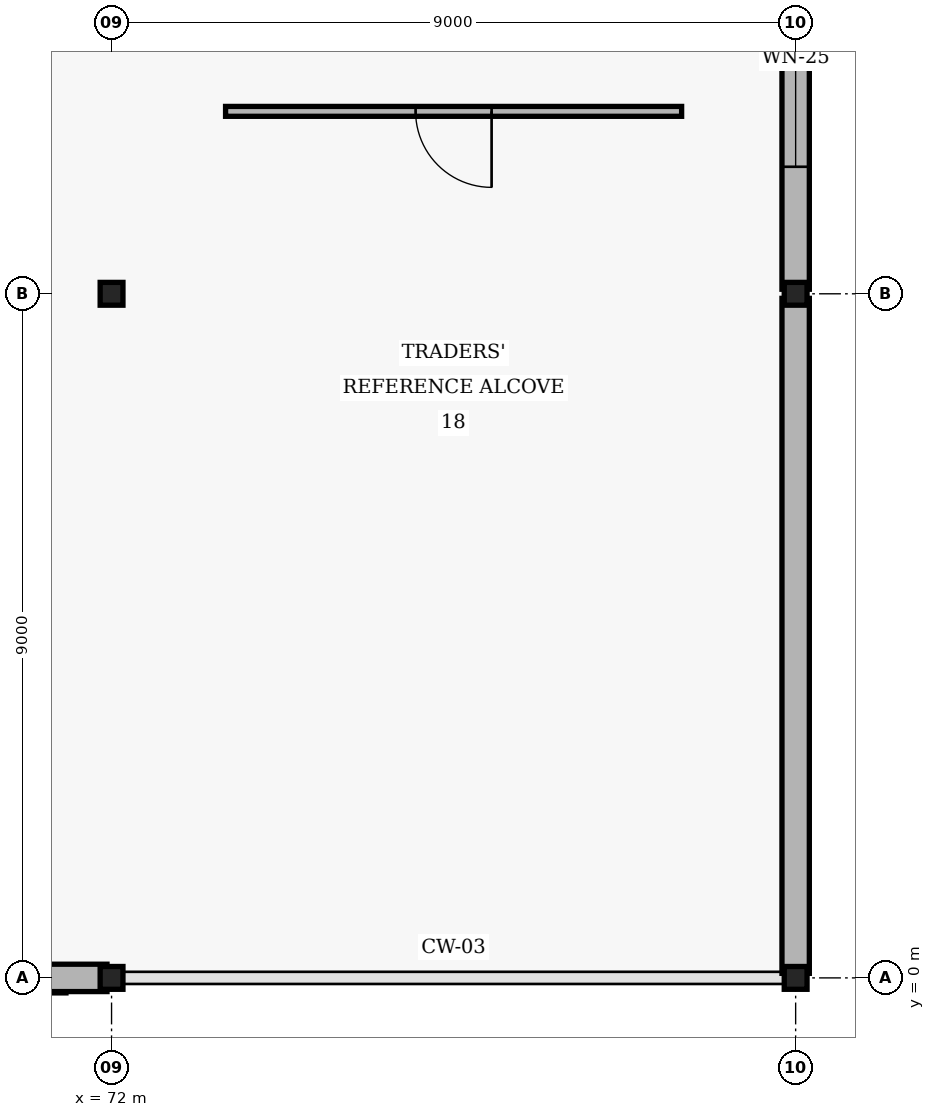
"""IFC4 building model, lengths in metres.
Left out: names, types, materials, properties, quantities, classifications, styles, units other than length and angle.
Written with IfcOpenShell. Run it as: python <this file> out.ifc"""

import sys

from ifc_helpers import new_model, si_unit, direction, frame, frame_2d, origin, origin_2d, place, context, subcontext, project, spatial, rectangle, i_section, extrude, element, fill, save


model = new_model("IFC4")
c1 = context("Model", 3, precision=1e-05, world=origin(), true_north=direction((0.0, 1.0)))
c2 = subcontext(c1, "Body", "Model", "MODEL_VIEW")
j1 = project(units=[si_unit("LENGTHUNIT", "METRE"), si_unit("PLANEANGLEUNIT", "RADIAN")], contexts=[c1])
p1 = place(None, origin())
s1 = spatial("IfcSite", under=j1, at=p1, CompositionType="ELEMENT")
p2 = place(p1, origin())
s2 = spatial("IfcBuilding", under=s1, at=p2, CompositionType="ELEMENT")
p3 = place(p2, frame((0.0, 0.0, 9.6)))
s3 = spatial("IfcBuildingStorey", under=s2, at=p3, CompositionType="ELEMENT", Elevation=9.6)
for number, where, z_axis, x_axis in (
    (1, (72.0, 0.0, 0.0), (0.0, 0.0, 1.0), (1.0, 0.0, 0.0)),
    (2, (72.0, 9.0, 0.0), (0.0, 0.0, 1.0), (1.0, 0.0, 0.0)),
    (3, (81.0, 0.0, 0.0), (0.0, 0.0, 1.0), (1.0, 0.0, 0.0)),
    (4, (81.0, 9.0, 0.0), (0.0, 0.0, 1.0), (1.0, 0.0, 0.0)),
):
    element("IfcColumn", number, at=place(p3, frame(where, z_axis=z_axis, x_axis=x_axis)), inside=s3, PredefinedType="COLUMN", context=c2, shape_type="SweptSolid", body=[
        extrude(i_section(OverallWidth=0.3, OverallDepth=0.3, WebThickness=0.011, FlangeThickness=0.019, FilletRadius=0.027, at=origin_2d()), origin(), (0.0, 0.0, 1.0), 3.9),
    ])
for number, where, z_axis, x_axis in (
    (5, (63.06, 0.0, 0.0), (0.0, 0.0, 1.0), (1.0, 0.0, 0.0)),
    (6, (81.0, 0.06, 0.0), (0.0, 0.0, 1.0), (0.0, 1.0, 0.0)),
):
    element("IfcWall", number, at=place(p3, frame(where, z_axis=z_axis, x_axis=x_axis)), inside=s3, PredefinedType="SOLIDWALL", context=c2, shape_type="SweptSolid", body=[
        extrude(rectangle(XDim=8.88, YDim=0.36, at=frame_2d((4.44, 0.0))), origin(), (0.0, 0.0, 1.0), 3.25),
    ])
p4 = place(p3, frame((81.0, 9.06, 0.0), z_axis=(0.0, 0.0, 1.0), x_axis=(0.0, 1.0, 0.0)))
e7 = element("IfcWall", 7, at=p4, inside=s3, PredefinedType="SOLIDWALL", context=c2, shape_type="SweptSolid", body=[
    extrude(rectangle(XDim=8.88, YDim=0.36, at=frame_2d((4.44, 0.0))), origin(), (0.0, 0.0, 1.0), 3.25),
])
p5 = place(p4, frame((1.611, 0.0, 0.9)))
e8 = element("IfcOpeningElement", 8, at=p5, cuts=e7, PredefinedType="OPENING", context=c2, shape_type="SweptSolid", body=[
    extrude(rectangle(XDim=1.75, YDim=2.25, at=frame_2d((0.875, 1.125))), frame((0.0, 0.19, 0.0), z_axis=(0.0, -1.0, 0.0), x_axis=(1.0, 0.0, 0.0)), (0.0, 0.0, 1.0), 0.38),
])
p6 = place(p4, frame((5.519, 0.0, 0.9)))
e9 = element("IfcOpeningElement", 9, at=p6, cuts=e7, PredefinedType="OPENING", context=c2, shape_type="SweptSolid", body=[
    extrude(rectangle(XDim=1.75, YDim=2.25, at=frame_2d((0.875, 1.125))), frame((0.0, 0.19, 0.0), z_axis=(0.0, -1.0, 0.0), x_axis=(1.0, 0.0, 0.0)), (0.0, 0.0, 1.0), 0.38),
])
p7 = place(p3, frame((73.5, 11.4, 0.0), z_axis=(0.0, 0.0, 1.0), x_axis=(1.0, 0.0, 0.0)))
e10 = element("IfcWall", 10, at=p7, inside=s3, PredefinedType="PARTITIONING", context=c2, shape_type="SweptSolid", body=[
    extrude(rectangle(XDim=6.0, YDim=0.13, at=frame_2d((3.0, 0.0))), origin(), (0.0, 0.0, 1.0), 2.9),
])
p8 = place(p7, frame((2.5, 0.0, 0.0)))
e11 = element("IfcOpeningElement", 11, at=p8, cuts=e10, PredefinedType="OPENING", context=c2, shape_type="SweptSolid", body=[
    extrude(rectangle(XDim=1.0, YDim=2.1, at=frame_2d((0.5, 1.05))), frame((0.0, 0.075, 0.0), z_axis=(0.0, -1.0, 0.0), x_axis=(1.0, 0.0, 0.0)), (0.0, 0.0, 1.0), 0.15),
])
p9 = place(p5, origin())
e12 = element("IfcWindow", 12, at=p9, inside=s3, PartitioningType="SINGLE_PANEL", PredefinedType="WINDOW", context=c2, shape_type="SweptSolid", body=[
    extrude(rectangle(XDim=1.75, YDim=2.25, at=frame_2d((0.875, 1.125))), frame((0.0, 0.03, 0.0), z_axis=(0.0, -1.0, 0.0), x_axis=(1.0, 0.0, 0.0)), (0.0, 0.0, 1.0), 0.06),
])
fill(e8, e12)
p10 = place(p8, origin())
e13 = element("IfcDoor", 13, at=p10, inside=s3, OperationType="SINGLE_SWING_RIGHT", PredefinedType="DOOR", context=c2, shape_type="SweptSolid", body=[
    extrude(rectangle(XDim=1.0, YDim=2.1, at=frame_2d((0.5, 1.05))), frame((0.0, 0.025, 0.0), z_axis=(0.0, -1.0, 0.0), x_axis=(1.0, 0.0, 0.0)), (0.0, 0.0, 1.0), 0.05),
])
fill(e11, e13)
save(model, sys.argv[1])
